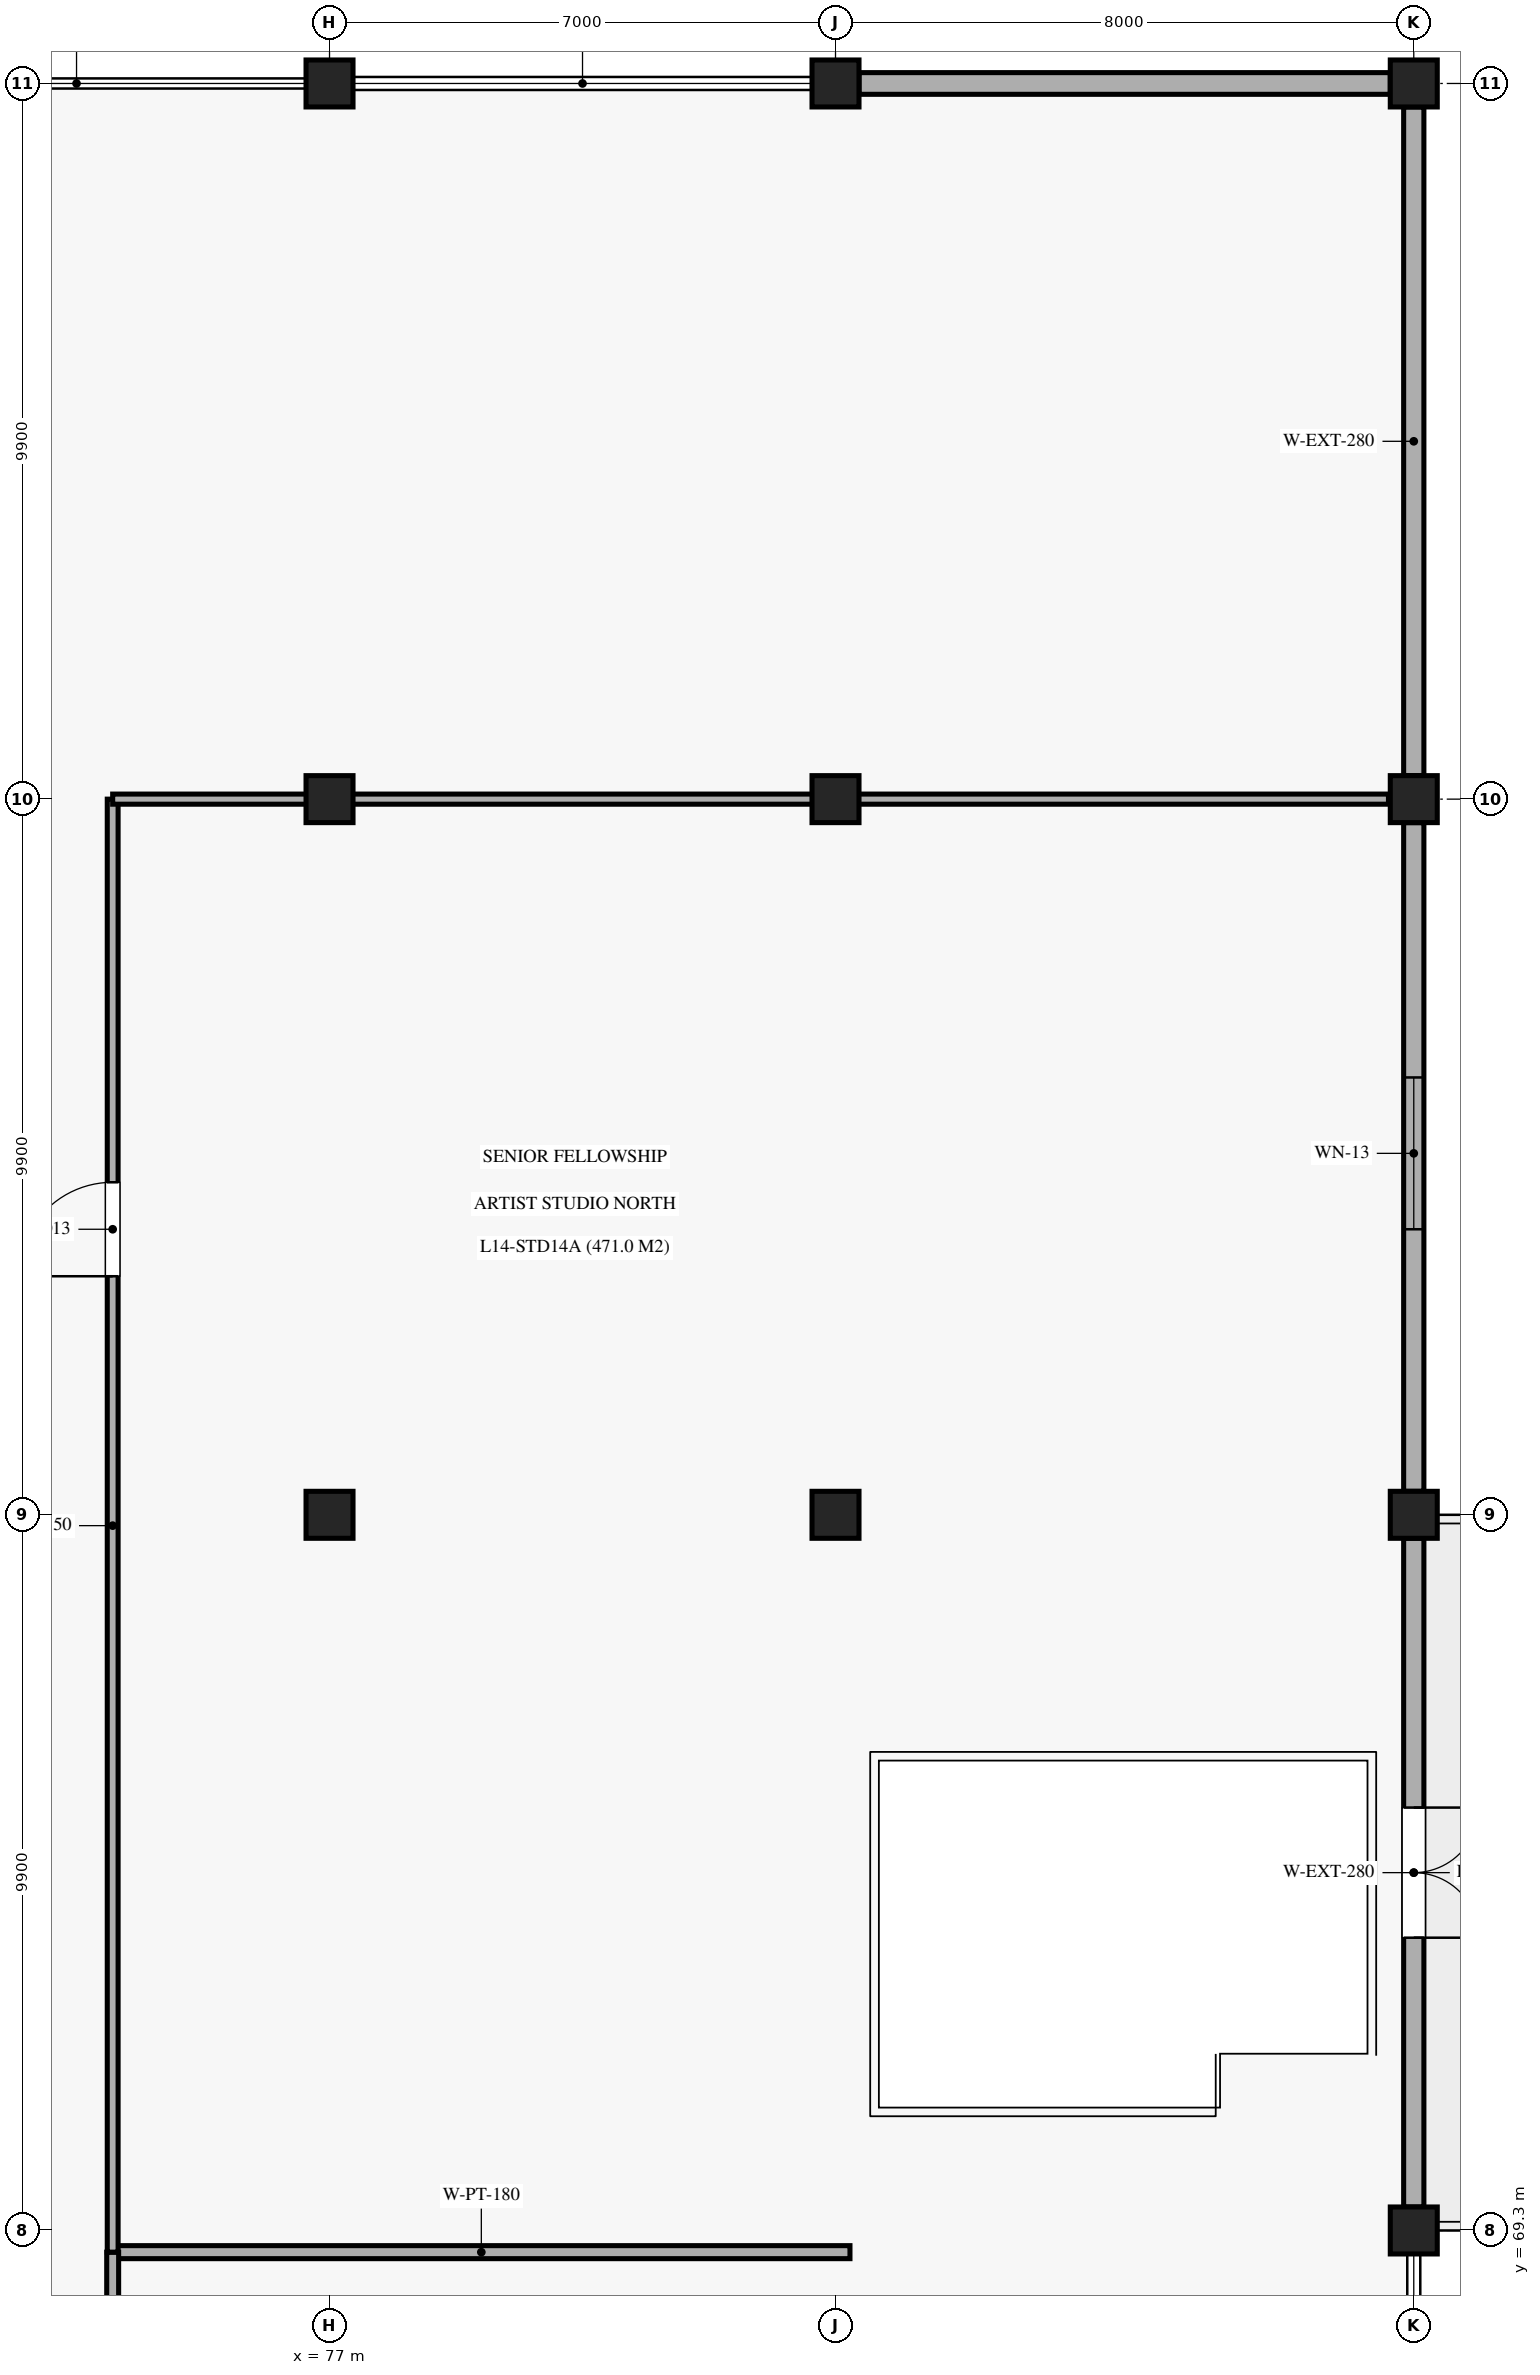
"""IFC4 building model, lengths in metres.
Left out: names, types, materials, properties, quantities, classifications, styles, units other than length and angle.
Written with IfcOpenShell. Run it as: python <this file> out.ifc"""

import sys

from ifc_helpers import new_model, si_unit, direction, frame, frame_2d, origin, origin_2d, place, context, subcontext, project, spatial, rectangle, extrude, element, fill, save


model = new_model("IFC4")
c1 = context("Model", 3, precision=1e-05, world=origin(), true_north=direction((0.0, 1.0)))
c2 = subcontext(c1, "Body", "Model", "MODEL_VIEW")
j1 = project(units=[si_unit("LENGTHUNIT", "METRE"), si_unit("PLANEANGLEUNIT", "RADIAN")], contexts=[c1])
p1 = place(None, origin())
s1 = spatial("IfcSite", under=j1, at=p1, CompositionType="ELEMENT")
p2 = place(p1, origin())
s2 = spatial("IfcBuilding", under=s1, at=p2, CompositionType="ELEMENT")
p3 = place(p2, frame((0.0, 0.0, 70.38)))
s3 = spatial("IfcBuildingStorey", under=s2, at=p3, CompositionType="ELEMENT", Elevation=70.38)
for number, where, z_axis, x_axis in (
    (1, (77.0, 79.2, 0.0), (0.0, 0.0, 1.0), (1.0, 0.0, 0.0)),
    (2, (77.0, 89.1, 0.0), (0.0, 0.0, 1.0), (1.0, 0.0, 0.0)),
    (3, (77.0, 99.0, 0.0), (0.0, 0.0, 1.0), (1.0, 0.0, 0.0)),
    (4, (84.0, 79.2, 0.0), (0.0, 0.0, 1.0), (1.0, 0.0, 0.0)),
    (5, (84.0, 89.1, 0.0), (0.0, 0.0, 1.0), (1.0, 0.0, 0.0)),
    (6, (84.0, 99.0, 0.0), (0.0, 0.0, 1.0), (1.0, 0.0, 0.0)),
    (7, (92.0, 69.3, 0.0), (0.0, 0.0, 1.0), (1.0, 0.0, 0.0)),
    (8, (92.0, 79.2, 0.0), (0.0, 0.0, 1.0), (1.0, 0.0, 0.0)),
    (9, (92.0, 89.1, 0.0), (0.0, 0.0, 1.0), (1.0, 0.0, 0.0)),
    (10, (92.0, 99.0, 0.0), (0.0, 0.0, 1.0), (1.0, 0.0, 0.0)),
):
    element("IfcColumn", number, at=place(p3, frame(where, z_axis=z_axis, x_axis=x_axis)), inside=s3, PredefinedType="COLUMN", context=c2, shape_type="SweptSolid", body=[
        extrude(rectangle(XDim=0.65, YDim=0.65, at=origin_2d()), origin(), (0.0, 0.0, 1.0), 4.08),
    ])
p4 = place(p3, frame((92.0, 69.625, 0.0), z_axis=(0.0, 0.0, 1.0), x_axis=(0.0, 1.0, 0.0)))
e11 = element("IfcWall", 11, at=p4, inside=s3, PredefinedType="SOLIDWALL", context=c2, shape_type="SweptSolid", body=[
    extrude(rectangle(XDim=9.25, YDim=0.28, at=frame_2d((4.625, 0.0))), origin(), (0.0, 0.0, 1.0), 3.08),
])
p5 = place(p4, frame((3.725, 0.0, 0.0)))
e12 = element("IfcOpeningElement", 12, at=p5, cuts=e11, PredefinedType="OPENING", context=c2, shape_type="SweptSolid", body=[
    extrude(rectangle(XDim=1.8, YDim=2.25, at=frame_2d((0.9, 1.125))), frame((0.0, 0.15, 0.0), z_axis=(0.0, -1.0, 0.0), x_axis=(1.0, 0.0, 0.0)), (0.0, 0.0, 1.0), 0.3),
])
p6 = place(p3, frame((92.0, 79.525, 0.0), z_axis=(0.0, 0.0, 1.0), x_axis=(0.0, 1.0, 0.0)))
e13 = element("IfcWall", 13, at=p6, inside=s3, PredefinedType="SOLIDWALL", context=c2, shape_type="SweptSolid", body=[
    extrude(rectangle(XDim=9.25, YDim=0.28, at=frame_2d((4.625, 0.0))), origin(), (0.0, 0.0, 1.0), 3.08),
])
p7 = place(p6, frame((3.625, 0.0, 1.15)))
e14 = element("IfcOpeningElement", 14, at=p7, cuts=e13, PredefinedType="OPENING", context=c2, shape_type="SweptSolid", body=[
    extrude(rectangle(XDim=2.1, YDim=1.5, at=frame_2d((1.05, 0.75))), frame((0.0, 0.15, 0.0), z_axis=(0.0, -1.0, 0.0), x_axis=(1.0, 0.0, 0.0)), (0.0, 0.0, 1.0), 0.3),
])
p8 = place(p3, frame((92.0, 89.425, 0.0), z_axis=(0.0, 0.0, 1.0), x_axis=(0.0, 1.0, 0.0)))
e15 = element("IfcWall", 15, at=p8, inside=s3, PredefinedType="SOLIDWALL", context=c2, shape_type="SweptSolid", body=[
    extrude(rectangle(XDim=9.25, YDim=0.28, at=frame_2d((4.625, 0.0))), origin(), (0.0, 0.0, 1.0), 3.08),
])
p9 = place(p3, frame((84.325, 99.0, 0.0), z_axis=(0.0, 0.0, 1.0), x_axis=(1.0, 0.0, 0.0)))
e16 = element("IfcWall", 16, at=p9, inside=s3, PredefinedType="SOLIDWALL", context=c2, shape_type="SweptSolid", body=[
    extrude(rectangle(XDim=7.35, YDim=0.3, at=frame_2d((3.675, 0.0))), origin(), (0.0, 0.0, 1.0), 3.08),
])
p10 = place(p3, frame((74.0, 69.0, 0.0), z_axis=(0.0, 0.0, 1.0), x_axis=(1.0, 0.0, 0.0)))
e17 = element("IfcWall", 17, at=p10, inside=s3, PredefinedType="PARTITIONING", context=c2, shape_type="SweptSolid", body=[
    extrude(rectangle(XDim=10.2, YDim=0.18, at=frame_2d((5.1, 0.0))), origin(), (0.0, 0.0, 1.0), 2.95),
])
p11 = place(p3, frame((74.0, 50.0, 0.0), z_axis=(0.0, 0.0, 1.0), x_axis=(0.0, 1.0, 0.0)))
e18 = element("IfcWall", 18, at=p11, inside=s3, PredefinedType="PARTITIONING", context=c2, shape_type="SweptSolid", body=[
    extrude(rectangle(XDim=19.0, YDim=0.165, at=frame_2d((9.5, 0.0))), origin(), (0.0, 0.0, 1.0), 2.95),
])
p12 = place(p11, frame((8.0, 0.0, 0.0)))
e19 = element("IfcOpeningElement", 19, at=p12, cuts=e18, PredefinedType="OPENING", context=c2, shape_type="SweptSolid", body=[
    extrude(rectangle(XDim=1.8, YDim=2.45, at=frame_2d((0.9, 1.225))), frame((0.0, 0.093, 0.0), z_axis=(0.0, -1.0, 0.0), x_axis=(1.0, 0.0, 0.0)), (0.0, 0.0, 1.0), 0.185),
])
p13 = place(p3, frame((74.0, 69.0, 0.0), z_axis=(0.0, 0.0, 1.0), x_axis=(0.0, 1.0, 0.0)))
e20 = element("IfcWall", 20, at=p13, inside=s3, PredefinedType="PARTITIONING", context=c2, shape_type="SweptSolid", body=[
    extrude(rectangle(XDim=20.1, YDim=0.15, at=frame_2d((10.05, 0.0))), origin(), (0.0, 0.0, 1.0), 2.95),
])
p14 = place(p13, frame((13.5, 0.0, 0.0)))
e21 = element("IfcOpeningElement", 21, at=p14, cuts=e20, PredefinedType="OPENING", context=c2, shape_type="SweptSolid", body=[
    extrude(rectangle(XDim=1.3, YDim=2.25, at=frame_2d((0.65, 1.125))), frame((0.0, 0.085, 0.0), z_axis=(0.0, -1.0, 0.0), x_axis=(1.0, 0.0, 0.0)), (0.0, 0.0, 1.0), 0.17),
])
p15 = place(p3, frame((74.0, 89.1, 0.0), z_axis=(0.0, 0.0, 1.0), x_axis=(1.0, 0.0, 0.0)))
e22 = element("IfcWall", 22, at=p15, inside=s3, PredefinedType="PARTITIONING", context=c2, shape_type="SweptSolid", body=[
    extrude(rectangle(XDim=17.65, YDim=0.14, at=frame_2d((8.825, 0.0))), origin(), (0.0, 0.0, 1.0), 2.95),
])
p16 = place(p5, frame((1.8, 0.0, 0.0), z_axis=(0.0, 0.0, 1.0), x_axis=(-1.0, 0.0, 0.0)))
e23 = element("IfcDoor", 23, at=p16, inside=s3, OperationType="DOUBLE_DOOR_SINGLE_SWING", PredefinedType="DOOR", context=c2, shape_type="SweptSolid", body=[
    extrude(rectangle(XDim=1.8, YDim=2.25, at=frame_2d((0.9, 1.125))), frame((0.0, 0.025, 0.0), z_axis=(0.0, -1.0, 0.0), x_axis=(1.0, 0.0, 0.0)), (0.0, 0.0, 1.0), 0.05),
])
fill(e12, e23)
p17 = place(p7, origin())
e24 = element("IfcWindow", 24, at=p17, inside=s3, PartitioningType="SINGLE_PANEL", PredefinedType="WINDOW", context=c2, shape_type="SweptSolid", body=[
    extrude(rectangle(XDim=2.1, YDim=1.5, at=frame_2d((1.05, 0.75))), frame((0.0, 0.03, 0.0), z_axis=(0.0, -1.0, 0.0), x_axis=(1.0, 0.0, 0.0)), (0.0, 0.0, 1.0), 0.06),
])
fill(e14, e24)
p18 = place(p14, origin())
e25 = element("IfcDoor", 25, at=p18, inside=s3, OperationType="SINGLE_SWING_LEFT", PredefinedType="DOOR", context=c2, shape_type="SweptSolid", body=[
    extrude(rectangle(XDim=1.3, YDim=2.25, at=frame_2d((0.65, 1.125))), frame((0.0, 0.025, 0.0), z_axis=(0.0, -1.0, 0.0), x_axis=(1.0, 0.0, 0.0)), (0.0, 0.0, 1.0), 0.05),
])
fill(e21, e25)
save(model, sys.argv[1])
